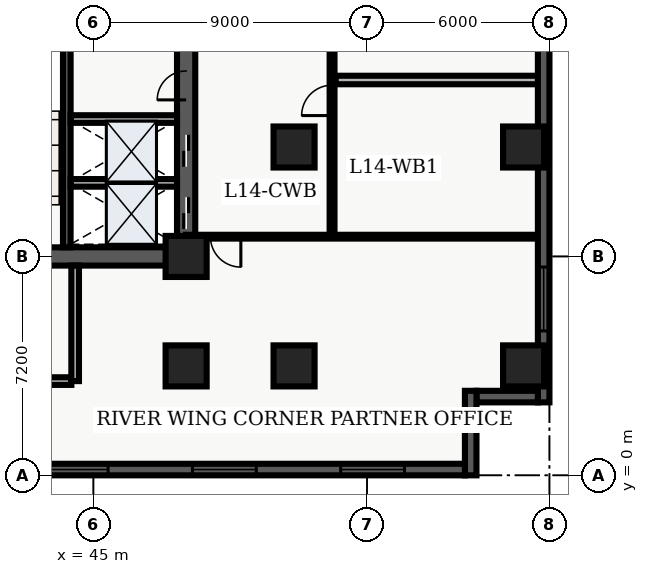
"""IFC4 building model, lengths in metres.
Left out: names, types, materials, properties, quantities, classifications, styles, units other than length and angle.
Written with IfcOpenShell. Run it as: python <this file> out.ifc"""

import sys

from ifc_helpers import new_model, entity, si_unit, converted_unit, direction, frame, origin_with_axes, origin_2d_with_axis, place, context, subcontext, project, spatial, polyline, rectangle, outline, extrude, element, fill, save


model = new_model("IFC4")
c1 = context("Model", 3, precision=1e-05, world=origin_with_axes(), true_north=direction((0.0, 1.0)))
c2 = subcontext(c1, "Body", "Model", "MODEL_VIEW")
j1 = project(units=[si_unit("LENGTHUNIT", "METRE"), converted_unit("PLANEANGLEUNIT", "DEGREE", entity("IfcPlaneAngleMeasure", 0.017), si_unit("PLANEANGLEUNIT", "RADIAN"), dimensions=[0, 0, 0, 0, 0, 0, 0])], contexts=[c1])
p1 = place(None, origin_with_axes())
s1 = spatial("IfcSite", under=j1, at=p1, CompositionType="ELEMENT")
p2 = place(p1, origin_with_axes())
s2 = spatial("IfcBuilding", under=s1, at=p2, CompositionType="ELEMENT")
p3 = place(p2, frame((0.0, 0.0, 60.0), z_axis=(0.0, 0.0, 1.0), x_axis=(1.0, 0.0, 0.0)))
s3 = spatial("IfcBuildingStorey", under=s2, at=p3, CompositionType="ELEMENT", Elevation=60.0)
p4 = place(p3, frame((40.2, 7.2, 0.0), z_axis=(0.0, 0.0, 1.0), x_axis=(1.0, 0.0, 0.0)))
e1 = element("IfcWall", 1, at=p4, inside=s3, PredefinedType="SHEAR", context=c2, shape_type="SweptSolid", body=[
    extrude(outline(polyline([(0.0, -0.3), (7.85, -0.3), (7.85, 0.3), (0.0, 0.3), (0.0, -0.3)])), origin_with_axes(), (0.0, 0.0, 1.0), 3.66),
])
p5 = place(p4, frame((2.175, 0.0, 0.0), z_axis=(0.0, 0.0, 1.0), x_axis=(1.0, 0.0, 0.0)))
e2 = element("IfcOpeningElement", 2, at=p5, cuts=e1, PredefinedType="OPENING", context=c2, shape_type="SweptSolid", body=[
    extrude(rectangle(XDim=1.05, YDim=0.62, at=origin_2d_with_axis()), origin_with_axes(), (0.0, 0.0, 1.0), 2.15),
])
p6 = place(p3, frame((48.05, 7.2, 0.0), z_axis=(0.0, 0.0, 1.0), x_axis=(0.0, 1.0, 0.0)))
e3 = element("IfcWall", 3, at=p6, inside=s3, PredefinedType="SHEAR", context=c2, shape_type="SweptSolid", body=[
    extrude(outline(polyline([(0.0, -0.3), (15.6, -0.3), (15.6, 0.3), (0.0, 0.3), (0.0, -0.3)])), origin_with_axes(), (0.0, 0.0, 1.0), 3.66),
])
p7 = place(p6, frame((1.425, 0.0, 0.0), z_axis=(0.0, 0.0, 1.0), x_axis=(1.0, 0.0, 0.0)))
e4 = element("IfcOpeningElement", 4, at=p7, cuts=e3, PredefinedType="OPENING", context=c2, shape_type="SweptSolid", body=[
    extrude(rectangle(XDim=1.05, YDim=0.62, at=origin_2d_with_axis()), origin_with_axes(), (0.0, 0.0, 1.0), 2.15),
])
p8 = place(p6, frame((3.475, 0.0, 0.0), z_axis=(0.0, 0.0, 1.0), x_axis=(1.0, 0.0, 0.0)))
e5 = element("IfcOpeningElement", 5, at=p8, cuts=e3, PredefinedType="OPENING", context=c2, shape_type="SweptSolid", body=[
    extrude(rectangle(XDim=1.05, YDim=0.62, at=origin_2d_with_axis()), origin_with_axes(), (0.0, 0.0, 1.0), 2.15),
])
p9 = place(p6, frame((5.625, 0.0, 0.0), z_axis=(0.0, 0.0, 1.0), x_axis=(1.0, 0.0, 0.0)))
e6 = element("IfcOpeningElement", 6, at=p9, cuts=e3, PredefinedType="OPENING", context=c2, shape_type="SweptSolid", body=[
    extrude(rectangle(XDim=0.95, YDim=0.62, at=origin_2d_with_axis()), origin_with_axes(), (0.0, 0.0, 1.0), 2.15),
])
p10 = place(p3, frame((44.125, 7.5, 0.0), z_axis=(0.0, 0.0, 1.0), x_axis=(0.0, 1.0, 0.0)))
e7 = element("IfcWall", 7, at=p10, inside=s3, PredefinedType="SHEAR", context=c2, shape_type="SweptSolid", body=[
    extrude(outline(polyline([(0.0, -0.125), (15.0, -0.125), (15.0, 0.125), (0.0, 0.125), (0.0, -0.125)])), origin_with_axes(), (0.0, 0.0, 1.0), 3.66),
])
p11 = place(p3, frame((40.325, 3.1, 0.0), z_axis=(0.0, 0.0, 1.0), x_axis=(1.0, 0.0, 0.0)))
e8 = element("IfcWall", 8, at=p11, inside=s3, PredefinedType="SOLIDWALL", context=c2, shape_type="SweptSolid", body=[
    extrude(outline(polyline([(0.0, -0.125), (3.95, -0.125), (3.95, 0.125), (0.0, 0.125), (0.0, -0.125)])), origin_with_axes(), (0.0, 0.0, 1.0), 2.7),
])
p12 = place(p3, frame((44.4, 3.1, 0.0), z_axis=(0.0, 0.0, 1.0), x_axis=(0.0, 1.0, 0.0)))
e9 = element("IfcWall", 9, at=p12, inside=s3, PredefinedType="SOLIDWALL", context=c2, shape_type="SweptSolid", body=[
    extrude(outline(polyline([(0.0, -0.125), (3.8, -0.125), (3.8, 0.125), (0.0, 0.125), (0.0, -0.125)])), origin_with_axes(), (0.0, 0.0, 1.0), 2.7),
])
for number, where, z_axis, x_axis in (
    (10, (48.05, 3.6, 0.0), (0.0, 0.0, 1.0), (1.0, 0.0, 0.0)),
    (11, (48.05, 7.2, 0.0), (0.0, 0.0, 1.0), (1.0, 0.0, 0.0)),
    (12, (51.6, 3.6, 0.0), (0.0, 0.0, 1.0), (1.0, 0.0, 0.0)),
    (13, (51.6, 10.8, 0.0), (0.0, 0.0, 1.0), (1.0, 0.0, 0.0)),
    (14, (59.15, 3.6, 0.0), (0.0, 0.0, 1.0), (1.0, 0.0, 0.0)),
    (15, (59.15, 10.8, 0.0), (0.0, 0.0, 1.0), (1.0, 0.0, 0.0)),
):
    element("IfcColumn", number, at=place(p3, frame(where, z_axis=z_axis, x_axis=x_axis)), inside=s3, PredefinedType="COLUMN", context=c2, shape_type="SweptSolid", body=[
        extrude(rectangle(XDim=1.35, YDim=1.35, at=origin_2d_with_axis()), origin_with_axes(), (0.0, 0.0, 1.0), 3.9),
    ])
for number, where, z_axis, x_axis in (
    (16, (44.25, 9.62, 0.0), (0.0, 0.0, 1.0), (1.0, 0.0, 0.0)),
    (17, (44.25, 11.72, 0.0), (0.0, 0.0, 1.0), (1.0, 0.0, 0.0)),
):
    element("IfcWall", number, at=place(p3, frame(where, z_axis=z_axis, x_axis=x_axis)), inside=s3, PredefinedType="SOLIDWALL", context=c2, shape_type="SweptSolid", body=[
        extrude(outline(polyline([(0.0, -0.125), (3.5, -0.125), (3.5, 0.125), (0.0, 0.125), (0.0, -0.125)])), origin_with_axes(), (0.0, 0.0, 1.0), 2.7),
    ])
p13 = place(p3, frame((52.85, 7.85, 0.0), z_axis=(0.0, 0.0, 1.0), x_axis=(0.0, 1.0, 0.0)))
e18 = element("IfcWall", 18, at=p13, inside=s3, PredefinedType="PARTITIONING", context=c2, shape_type="SweptSolid", body=[
    extrude(outline(polyline([(0.0, -0.08), (18.8, -0.08), (18.8, 0.08), (0.0, 0.08), (0.0, -0.08)])), origin_with_axes(), (0.0, 0.0, 1.0), 2.7),
])
p14 = place(p13, frame((4.484, 0.0, 0.0), z_axis=(0.0, 0.0, 1.0), x_axis=(1.0, 0.0, 0.0)))
e19 = element("IfcOpeningElement", 19, at=p14, cuts=e18, PredefinedType="OPENING", context=c2, shape_type="SweptSolid", body=[
    extrude(rectangle(XDim=1.0, YDim=0.18, at=origin_2d_with_axis()), origin_with_axes(), (0.0, 0.0, 1.0), 2.15),
])
p15 = place(p13, frame((7.687, 0.0, 0.0), z_axis=(0.0, 0.0, 1.0), x_axis=(1.0, 0.0, 0.0)))
e20 = element("IfcOpeningElement", 20, at=p15, cuts=e18, PredefinedType="OPENING", context=c2, shape_type="SweptSolid", body=[
    extrude(rectangle(XDim=1.0, YDim=0.18, at=origin_2d_with_axis()), origin_with_axes(), (0.0, 0.0, 1.0), 2.15),
])
p16 = place(p13, frame((13.79, 0.0, 0.0), z_axis=(0.0, 0.0, 1.0), x_axis=(1.0, 0.0, 0.0)))
e21 = element("IfcOpeningElement", 21, at=p16, cuts=e18, PredefinedType="OPENING", context=c2, shape_type="SweptSolid", body=[
    extrude(rectangle(XDim=1.0, YDim=0.18, at=origin_2d_with_axis()), origin_with_axes(), (0.0, 0.0, 1.0), 2.15),
])
p17 = place(p3, frame((59.64, 7.85, 0.0), z_axis=(0.0, 0.0, 1.0), x_axis=(-1.0, 0.0, 0.0)))
e22 = element("IfcWall", 22, at=p17, inside=s3, PredefinedType="PARTITIONING", context=c2, shape_type="SweptSolid", body=[
    extrude(outline(polyline([(0.0, -0.062), (11.59, -0.062), (11.59, 0.062), (0.0, 0.062), (0.0, -0.062)])), origin_with_axes(), (0.0, 0.0, 1.0), 2.7),
])
p18 = place(p17, frame((10.29, 0.0, 0.0), z_axis=(0.0, 0.0, 1.0), x_axis=(1.0, 0.0, 0.0)))
e23 = element("IfcOpeningElement", 23, at=p18, cuts=e22, PredefinedType="OPENING", context=c2, shape_type="SweptSolid", body=[
    extrude(rectangle(XDim=1.0, YDim=0.145, at=origin_2d_with_axis()), origin_with_axes(), (0.0, 0.0, 1.0), 2.15),
])
p19 = place(p3, frame((52.97, 13.004, 0.0), z_axis=(0.0, 0.0, 1.0), x_axis=(1.0, 0.0, 0.0)))
e24 = element("IfcWall", 24, at=p19, inside=s3, PredefinedType="PARTITIONING", context=c2, shape_type="SweptSolid", body=[
    extrude(outline(polyline([(0.0, -0.14), (6.655, -0.14), (6.655, 0.14), (0.0, 0.14), (0.0, -0.14)])), origin_with_axes(), (0.0, 0.0, 1.0), 2.7),
])
p20 = place(p3, frame((59.81, 26.02, 0.0), z_axis=(0.0, 0.0, 1.0), x_axis=(0.0, -1.0, 0.0)))
e25 = element("IfcWall", 25, at=p20, inside=s3, PredefinedType="SOLIDWALL", context=c2, shape_type="SweptSolid", body=[
    extrude(outline(polyline([(0.0, -0.19), (23.62, -0.19), (23.62, 0.19), (0.0, 0.19), (0.0, -0.19)])), origin_with_axes(), (0.0, 0.0, 1.0), 3.66),
])
p21 = place(p20, frame((3.853, 0.0, 0.45), z_axis=(0.0, 0.0, 1.0), x_axis=(1.0, 0.0, 0.0)))
e26 = element("IfcOpeningElement", 26, at=p21, cuts=e25, PredefinedType="OPENING", context=c2, shape_type="SweptSolid", body=[
    extrude(rectangle(XDim=2.1, YDim=0.4, at=origin_2d_with_axis()), origin_with_axes(), (0.0, 0.0, 1.0), 2.2),
])
p22 = place(p20, frame((20.218, 0.0, 0.45), z_axis=(0.0, 0.0, 1.0), x_axis=(1.0, 0.0, 0.0)))
e27 = element("IfcOpeningElement", 27, at=p22, cuts=e25, PredefinedType="OPENING", context=c2, shape_type="SweptSolid", body=[
    extrude(rectangle(XDim=2.1, YDim=0.4, at=origin_2d_with_axis()), origin_with_axes(), (0.0, 0.0, 1.0), 2.2),
])
p23 = place(p3, frame((59.62, 2.59, 0.0), z_axis=(0.0, 0.0, 1.0), x_axis=(-1.0, 0.0, 0.0)))
e28 = element("IfcWall", 28, at=p23, inside=s3, PredefinedType="SOLIDWALL", context=c2, shape_type="SweptSolid", body=[
    extrude(outline(polyline([(0.0, -0.19), (2.02, -0.19), (2.02, 0.19), (0.0, 0.19), (0.0, -0.19)])), origin_with_axes(), (0.0, 0.0, 1.0), 3.66),
])
p24 = place(p3, frame((57.41, 2.78, 0.0), z_axis=(0.0, 0.0, 1.0), x_axis=(0.0, -1.0, 0.0)))
e29 = element("IfcWall", 29, at=p24, inside=s3, PredefinedType="SOLIDWALL", context=c2, shape_type="SweptSolid", body=[
    extrude(outline(polyline([(0.0, -0.19), (2.78, -0.19), (2.78, 0.19), (0.0, 0.19), (0.0, -0.19)])), origin_with_axes(), (0.0, 0.0, 1.0), 3.66),
])
p25 = place(p3, frame((57.22, 0.19, 0.0), z_axis=(0.0, 0.0, 1.0), x_axis=(-1.0, 0.0, 0.0)))
e30 = element("IfcWall", 30, at=p25, inside=s3, PredefinedType="SOLIDWALL", context=c2, shape_type="SweptSolid", body=[
    extrude(outline(polyline([(0.0, -0.19), (54.82, -0.19), (54.82, 0.19), (0.0, 0.19), (0.0, -0.19)])), origin_with_axes(), (0.0, 0.0, 1.0), 3.66),
])
p26 = place(p25, frame((3.037, 0.0, 0.45), z_axis=(0.0, 0.0, 1.0), x_axis=(1.0, 0.0, 0.0)))
e31 = element("IfcOpeningElement", 31, at=p26, cuts=e30, PredefinedType="OPENING", context=c2, shape_type="SweptSolid", body=[
    extrude(rectangle(XDim=2.1, YDim=0.4, at=origin_2d_with_axis()), origin_with_axes(), (0.0, 0.0, 1.0), 2.2),
])
p27 = place(p25, frame((7.912, 0.0, 0.45), z_axis=(0.0, 0.0, 1.0), x_axis=(1.0, 0.0, 0.0)))
e32 = element("IfcOpeningElement", 32, at=p27, cuts=e30, PredefinedType="OPENING", context=c2, shape_type="SweptSolid", body=[
    extrude(rectangle(XDim=2.1, YDim=0.4, at=origin_2d_with_axis()), origin_with_axes(), (0.0, 0.0, 1.0), 2.2),
])
p28 = place(p25, frame((12.786, 0.0, 0.45), z_axis=(0.0, 0.0, 1.0), x_axis=(1.0, 0.0, 0.0)))
e33 = element("IfcOpeningElement", 33, at=p28, cuts=e30, PredefinedType="OPENING", context=c2, shape_type="SweptSolid", body=[
    extrude(rectangle(XDim=2.1, YDim=0.4, at=origin_2d_with_axis()), origin_with_axes(), (0.0, 0.0, 1.0), 2.2),
])
p29 = place(p25, frame((17.661, 0.0, 0.45), z_axis=(0.0, 0.0, 1.0), x_axis=(1.0, 0.0, 0.0)))
e34 = element("IfcOpeningElement", 34, at=p29, cuts=e30, PredefinedType="OPENING", context=c2, shape_type="SweptSolid", body=[
    extrude(rectangle(XDim=2.1, YDim=0.4, at=origin_2d_with_axis()), origin_with_axes(), (0.0, 0.0, 1.0), 2.2),
])
p30 = place(p25, frame((22.535, 0.0, 0.45), z_axis=(0.0, 0.0, 1.0), x_axis=(1.0, 0.0, 0.0)))
e35 = element("IfcOpeningElement", 35, at=p30, cuts=e30, PredefinedType="OPENING", context=c2, shape_type="SweptSolid", body=[
    extrude(rectangle(XDim=2.1, YDim=0.4, at=origin_2d_with_axis()), origin_with_axes(), (0.0, 0.0, 1.0), 2.2),
])
p31 = place(p25, frame((27.41, 0.0, 0.45), z_axis=(0.0, 0.0, 1.0), x_axis=(1.0, 0.0, 0.0)))
e36 = element("IfcOpeningElement", 36, at=p31, cuts=e30, PredefinedType="OPENING", context=c2, shape_type="SweptSolid", body=[
    extrude(rectangle(XDim=2.1, YDim=0.4, at=origin_2d_with_axis()), origin_with_axes(), (0.0, 0.0, 1.0), 2.2),
])
p32 = place(p25, frame((32.285, 0.0, 0.45), z_axis=(0.0, 0.0, 1.0), x_axis=(1.0, 0.0, 0.0)))
e37 = element("IfcOpeningElement", 37, at=p32, cuts=e30, PredefinedType="OPENING", context=c2, shape_type="SweptSolid", body=[
    extrude(rectangle(XDim=2.1, YDim=0.4, at=origin_2d_with_axis()), origin_with_axes(), (0.0, 0.0, 1.0), 2.2),
])
p33 = place(p25, frame((37.159, 0.0, 0.45), z_axis=(0.0, 0.0, 1.0), x_axis=(1.0, 0.0, 0.0)))
e38 = element("IfcOpeningElement", 38, at=p33, cuts=e30, PredefinedType="OPENING", context=c2, shape_type="SweptSolid", body=[
    extrude(rectangle(XDim=2.1, YDim=0.4, at=origin_2d_with_axis()), origin_with_axes(), (0.0, 0.0, 1.0), 2.2),
])
p34 = place(p25, frame((46.908, 0.0, 0.45), z_axis=(0.0, 0.0, 1.0), x_axis=(1.0, 0.0, 0.0)))
e39 = element("IfcOpeningElement", 39, at=p34, cuts=e30, PredefinedType="OPENING", context=c2, shape_type="SweptSolid", body=[
    extrude(rectangle(XDim=2.1, YDim=0.4, at=origin_2d_with_axis()), origin_with_axes(), (0.0, 0.0, 1.0), 2.2),
])
p35 = place(p25, frame((51.783, 0.0, 0.45), z_axis=(0.0, 0.0, 1.0), x_axis=(1.0, 0.0, 0.0)))
e40 = element("IfcOpeningElement", 40, at=p35, cuts=e30, PredefinedType="OPENING", context=c2, shape_type="SweptSolid", body=[
    extrude(rectangle(XDim=2.1, YDim=0.4, at=origin_2d_with_axis()), origin_with_axes(), (0.0, 0.0, 1.0), 2.2),
])
p36 = place(p6, frame((1.425, 0.0, 0.0), z_axis=(0.0, 0.0, 1.0), x_axis=(1.0, 0.0, 0.0)))
e41 = element("IfcDoor", 41, at=p36, inside=s3, OperationType="SLIDING_TO_LEFT", PredefinedType="DOOR", context=c2, shape_type="SweptSolid", body=[
    extrude(rectangle(XDim=1.05, YDim=0.09, at=origin_2d_with_axis()), origin_with_axes(), (0.0, 0.0, 1.0), 2.15),
])
fill(e4, e41)
p37 = place(p6, frame((3.475, 0.0, 0.0), z_axis=(0.0, 0.0, 1.0), x_axis=(1.0, 0.0, 0.0)))
e42 = element("IfcDoor", 42, at=p37, inside=s3, OperationType="SLIDING_TO_RIGHT", PredefinedType="DOOR", context=c2, shape_type="SweptSolid", body=[
    extrude(rectangle(XDim=1.05, YDim=0.09, at=origin_2d_with_axis()), origin_with_axes(), (0.0, 0.0, 1.0), 2.15),
])
fill(e5, e42)
p38 = place(p6, frame((5.625, 0.0, 0.0), z_axis=(0.0, 0.0, 1.0), x_axis=(1.0, 0.0, 0.0)))
e43 = element("IfcDoor", 43, at=p38, inside=s3, OperationType="SINGLE_SWING_LEFT", PredefinedType="DOOR", context=c2, shape_type="SweptSolid", body=[
    extrude(rectangle(XDim=0.95, YDim=0.09, at=origin_2d_with_axis()), origin_with_axes(), (0.0, 0.0, 1.0), 2.15),
])
fill(e6, e43)
p39 = place(p17, frame((10.29, 0.0, 0.0), z_axis=(0.0, 0.0, 1.0), x_axis=(1.0, 0.0, 0.0)))
e44 = element("IfcDoor", 44, at=p39, inside=s3, OperationType="SINGLE_SWING_LEFT", PredefinedType="DOOR", context=c2, shape_type="SweptSolid", body=[
    extrude(rectangle(XDim=1.0, YDim=0.075, at=origin_2d_with_axis()), origin_with_axes(), (0.0, 0.0, 1.0), 2.15),
])
fill(e23, e44)
p40 = place(p13, frame((4.484, 0.0, 0.0), z_axis=(0.0, 0.0, 1.0), x_axis=(1.0, 0.0, 0.0)))
e45 = element("IfcDoor", 45, at=p40, inside=s3, OperationType="SINGLE_SWING_LEFT", PredefinedType="DOOR", context=c2, shape_type="SweptSolid", body=[
    extrude(rectangle(XDim=1.0, YDim=0.09, at=origin_2d_with_axis()), origin_with_axes(), (0.0, 0.0, 1.0), 2.15),
])
fill(e19, e45)
p41 = place(p20, frame((20.218, 0.0, 0.45), z_axis=(0.0, 0.0, 1.0), x_axis=(1.0, 0.0, 0.0)))
e46 = element("IfcWindow", 46, at=p41, inside=s3, PredefinedType="WINDOW", context=c2, shape_type="SweptSolid", body=[
    extrude(rectangle(XDim=2.1, YDim=0.09, at=origin_2d_with_axis()), origin_with_axes(), (0.0, 0.0, 1.0), 2.2),
])
fill(e27, e46)
p42 = place(p25, frame((3.037, 0.0, 0.45), z_axis=(0.0, 0.0, 1.0), x_axis=(1.0, 0.0, 0.0)))
e47 = element("IfcWindow", 47, at=p42, inside=s3, PredefinedType="WINDOW", context=c2, shape_type="SweptSolid", body=[
    extrude(rectangle(XDim=2.1, YDim=0.09, at=origin_2d_with_axis()), origin_with_axes(), (0.0, 0.0, 1.0), 2.2),
])
fill(e31, e47)
p43 = place(p25, frame((7.912, 0.0, 0.45), z_axis=(0.0, 0.0, 1.0), x_axis=(1.0, 0.0, 0.0)))
e48 = element("IfcWindow", 48, at=p43, inside=s3, PredefinedType="WINDOW", context=c2, shape_type="SweptSolid", body=[
    extrude(rectangle(XDim=2.1, YDim=0.09, at=origin_2d_with_axis()), origin_with_axes(), (0.0, 0.0, 1.0), 2.2),
])
fill(e32, e48)
p44 = place(p25, frame((12.786, 0.0, 0.45), z_axis=(0.0, 0.0, 1.0), x_axis=(1.0, 0.0, 0.0)))
e49 = element("IfcWindow", 49, at=p44, inside=s3, PredefinedType="WINDOW", context=c2, shape_type="SweptSolid", body=[
    extrude(rectangle(XDim=2.1, YDim=0.09, at=origin_2d_with_axis()), origin_with_axes(), (0.0, 0.0, 1.0), 2.2),
])
fill(e33, e49)
save(model, sys.argv[1])
